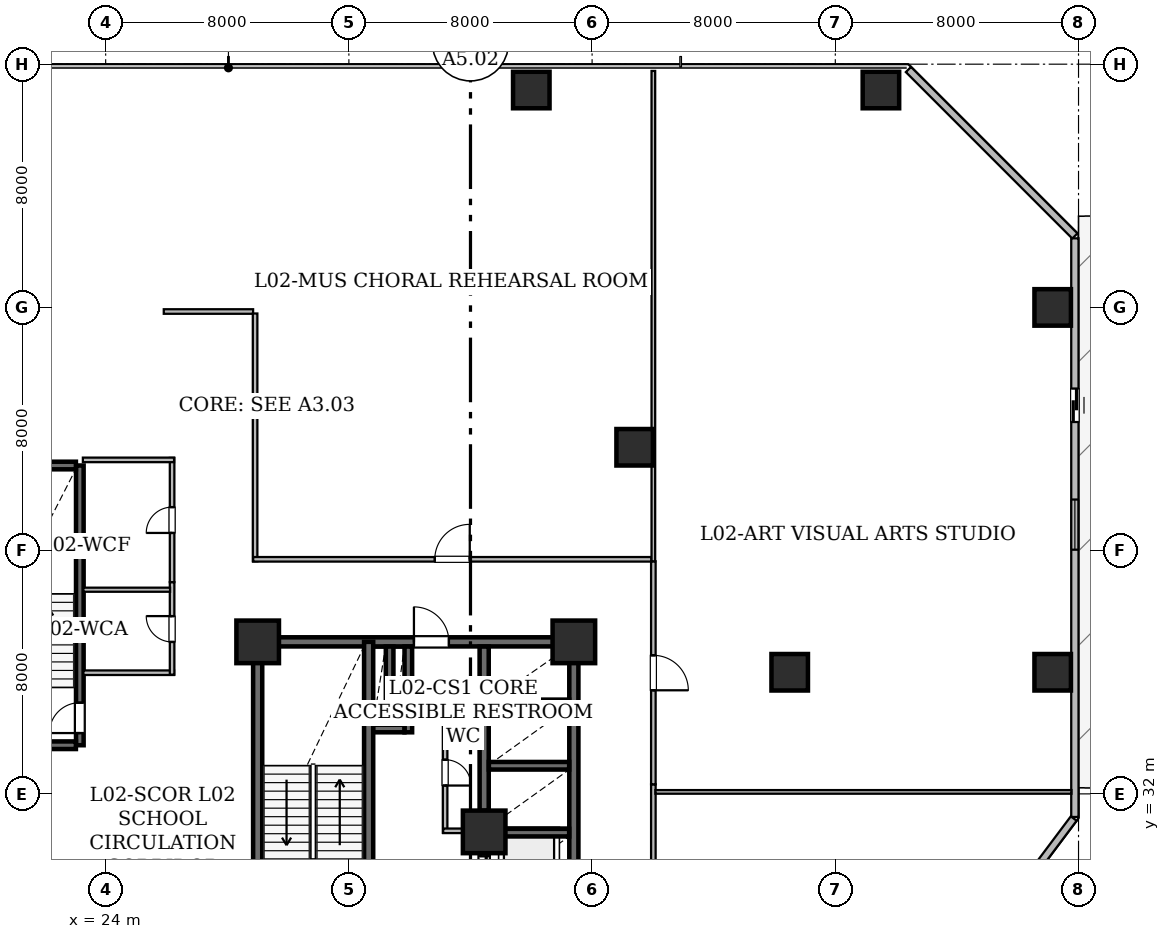
"""IFC4 building model, lengths in metres.
Left out: names, types, materials, properties, quantities, classifications, styles, units other than length and angle.
Written with IfcOpenShell. Run it as: python <this file> out.ifc"""

import sys

from ifc_helpers import new_model, si_unit, direction, frame, frame_2d, origin, origin_2d, place, context, subcontext, project, spatial, rectangle, hollow_rectangle, extrude, element, fill, save


model = new_model("IFC4")
c1 = context("Model", 3, precision=1e-05, world=origin(), true_north=direction((0.0, 1.0)))
c2 = subcontext(c1, "Body", "Model", "MODEL_VIEW")
j1 = project(units=[si_unit("LENGTHUNIT", "METRE"), si_unit("PLANEANGLEUNIT", "RADIAN")], contexts=[c1])
p1 = place(None, origin())
s1 = spatial("IfcSite", under=j1, at=p1, CompositionType="ELEMENT")
p2 = place(p1, origin())
s2 = spatial("IfcBuilding", under=s1, at=p2, CompositionType="ELEMENT")
p3 = place(p2, frame((0.0, 0.0, 12.0)))
s3 = spatial("IfcBuildingStorey", under=s2, at=p3, CompositionType="ELEMENT", Elevation=12.0)
for number, where, z_axis, x_axis in (
    (1, (29.0, 37.0, 0.0), (0.0, 0.0, 1.0), (1.0, 0.0, 0.0)),
    (2, (36.45, 30.75, 0.0), (0.0, 0.0, 1.0), (1.0, 0.0, 0.0)),
    (3, (39.4, 37.0, 0.0), (0.0, 0.0, 1.0), (1.0, 0.0, 0.0)),
):
    element("IfcColumn", number, at=place(p3, frame(where, z_axis=z_axis, x_axis=x_axis)), inside=s3, PredefinedType="COLUMN", context=c2, shape_type="SweptSolid", body=[
        extrude(hollow_rectangle(XDim=1.4, YDim=1.4, WallThickness=0.07, at=origin_2d()), origin(), (0.0, 0.0, 1.0), 4.2),
    ])
for number, where, z_axis, x_axis in (
    (4, (38.0, 55.15, 0.0), (0.0, 0.0, 1.0), (1.0, 0.0, 0.0)),
    (5, (49.5, 55.15, 0.0), (0.0, 0.0, 1.0), (1.0, 0.0, 0.0)),
    (6, (55.15, 36.0, 0.0), (0.0, 0.0, 1.0), (1.0, 0.0, 0.0)),
    (7, (55.15, 48.0, 0.0), (0.0, 0.0, 1.0), (1.0, 0.0, 0.0)),
    (8, (41.4, 43.4, 0.0), (0.0, 0.0, 1.0), (1.0, 0.0, 0.0)),
    (9, (46.5, 36.0, 0.0), (0.0, 0.0, 1.0), (1.0, 0.0, 0.0)),
):
    element("IfcColumn", number, at=place(p3, frame(where, z_axis=z_axis, x_axis=x_axis)), inside=s3, PredefinedType="COLUMN", context=c2, shape_type="SweptSolid", body=[
        extrude(hollow_rectangle(XDim=1.2, YDim=1.2, WallThickness=0.06, at=origin_2d()), origin(), (0.0, 0.0, 1.0), 4.2),
    ])
p4 = place(p3, frame((50.405, 55.825, 0.0), z_axis=(0.0, 0.0, 1.0), x_axis=(0.707106781187, -0.707106781187, 0.0)))
e10 = element("IfcWall", 10, at=p4, inside=s3, PredefinedType="STANDARD", context=c2, shape_type="SweptSolid", body=[
    extrude(rectangle(XDim=7.743, YDim=0.24, at=frame_2d((3.871, 0.0))), origin(), (0.0, 0.0, 1.0), 3.92),
])
p5 = place(p3, frame((55.88, 50.272, 0.0), z_axis=(0.0, 0.0, 1.0), x_axis=(0.0, -1.0, 0.0)))
e11 = element("IfcWall", 11, at=p5, inside=s3, PredefinedType="STANDARD", context=c2, shape_type="SweptSolid", body=[
    extrude(rectangle(XDim=19.032, YDim=0.24, at=frame_2d((9.516, 0.0))), origin(), (0.0, 0.0, 1.0), 3.92),
])
p6 = place(p5, frame((4.941, 0.0, 0.0)))
e12 = element("IfcOpeningElement", 12, at=p6, cuts=e11, PredefinedType="OPENING", context=c2, shape_type="SweptSolid", body=[
    extrude(rectangle(XDim=1.1, YDim=2.2, at=frame_2d((0.55, 1.1))), frame((0.0, 0.13, 0.0), z_axis=(0.0, -1.0, 0.0), x_axis=(1.0, 0.0, 0.0)), (0.0, 0.0, 1.0), 0.26),
])
p7 = place(p5, frame((8.591, 0.0, 0.85)))
e13 = element("IfcOpeningElement", 13, at=p7, cuts=e11, PredefinedType="OPENING", context=c2, shape_type="SweptSolid", body=[
    extrude(rectangle(XDim=1.65, YDim=1.55, at=frame_2d((0.825, 0.775))), frame((0.0, 0.13, 0.0), z_axis=(0.0, -1.0, 0.0), x_axis=(1.0, 0.0, 0.0)), (0.0, 0.0, 1.0), 0.26),
])
p8 = place(p3, frame((55.842, 31.189, 0.0), z_axis=(0.0, 0.0, 1.0), x_axis=(-0.600058791648, -0.799955902889, 0.0)))
e14 = element("IfcWall", 14, at=p8, inside=s3, PredefinedType="STANDARD", context=c2, shape_type="SweptSolid", body=[
    extrude(rectangle(XDim=3.986, YDim=0.24, at=frame_2d((1.993, 0.0))), origin(), (0.0, 0.0, 1.0), 3.92),
])
p9 = place(p3, frame((29.0, 28.0, 0.0), z_axis=(0.0, 0.0, 1.0), x_axis=(0.0, 1.0, 0.0)))
e15 = element("IfcWall", 15, at=p9, inside=s3, PredefinedType="SHEAR", context=c2, shape_type="SweptSolid", body=[
    extrude(rectangle(XDim=9.0, YDim=0.3, at=frame_2d((4.5, 0.0))), origin(), (0.0, 0.0, 1.0), 3.92),
])
p10 = place(p3, frame((29.0, 37.0, 0.0), z_axis=(0.0, 0.0, 1.0), x_axis=(1.0, 0.0, 0.0)))
e16 = element("IfcWall", 16, at=p10, inside=s3, PredefinedType="SHEAR", context=c2, shape_type="SweptSolid", body=[
    extrude(rectangle(XDim=10.4, YDim=0.3, at=frame_2d((5.2, 0.0))), origin(), (0.0, 0.0, 1.0), 3.92),
])
p11 = place(p10, frame((5.14, 0.0, 0.0)))
e17 = element("IfcOpeningElement", 17, at=p11, cuts=e16, PredefinedType="OPENING", context=c2, shape_type="SweptSolid", body=[
    extrude(rectangle(XDim=1.15, YDim=2.2, at=frame_2d((0.575, 1.1))), frame((0.0, 0.16, 0.0), z_axis=(0.0, -1.0, 0.0), x_axis=(1.0, 0.0, 0.0)), (0.0, 0.0, 1.0), 0.32),
])
p12 = place(p3, frame((39.4, 24.4, 0.0), z_axis=(0.0, 0.0, 1.0), x_axis=(0.0, 1.0, 0.0)))
e18 = element("IfcWall", 18, at=p12, inside=s3, PredefinedType="SHEAR", context=c2, shape_type="SweptSolid", body=[
    extrude(rectangle(XDim=12.6, YDim=0.3, at=frame_2d((6.3, 0.0))), origin(), (0.0, 0.0, 1.0), 3.92),
])
p13 = place(p3, frame((32.65, 28.0, 0.0), z_axis=(0.0, 0.0, 1.0), x_axis=(0.0, 1.0, 0.0)))
e19 = element("IfcWall", 19, at=p13, inside=s3, PredefinedType="SHEAR", context=c2, shape_type="SweptSolid", body=[
    extrude(rectangle(XDim=9.0, YDim=0.3, at=frame_2d((4.5, 0.0))), origin(), (0.0, 0.0, 1.0), 3.92),
])
p14 = place(p13, frame((0.72, 0.0, 0.0)))
e20 = element("IfcOpeningElement", 20, at=p14, cuts=e19, PredefinedType="OPENING", context=c2, shape_type="SweptSolid", body=[
    extrude(rectangle(XDim=1.0, YDim=2.15, at=frame_2d((0.5, 1.075))), frame((0.0, 0.16, 0.0), z_axis=(0.0, -1.0, 0.0), x_axis=(1.0, 0.0, 0.0)), (0.0, 0.0, 1.0), 0.32),
])
p15 = place(p3, frame((36.45, 25.1, 0.0), z_axis=(0.0, 0.0, 1.0), x_axis=(0.0, 1.0, 0.0)))
e21 = element("IfcWall", 21, at=p15, inside=s3, PredefinedType="SHEAR", context=c2, shape_type="SweptSolid", body=[
    extrude(rectangle(XDim=4.95, YDim=0.3, at=frame_2d((2.475, 0.0))), origin(), (0.0, 0.0, 1.0), 3.92),
])
p16 = place(p15, frame((0.12, 0.0, 0.0)))
e22 = element("IfcOpeningElement", 22, at=p16, cuts=e21, PredefinedType="OPENING", context=c2, shape_type="SweptSolid", body=[
    extrude(rectangle(XDim=1.05, YDim=2.15, at=frame_2d((0.525, 1.075))), frame((0.0, 0.16, 0.0), z_axis=(0.0, -1.0, 0.0), x_axis=(1.0, 0.0, 0.0)), (0.0, 0.0, 1.0), 0.32),
])
p17 = place(p15, frame((1.995, 0.0, 0.0)))
e23 = element("IfcOpeningElement", 23, at=p17, cuts=e21, PredefinedType="OPENING", context=c2, shape_type="SweptSolid", body=[
    extrude(rectangle(XDim=1.05, YDim=2.15, at=frame_2d((0.525, 1.075))), frame((0.0, 0.16, 0.0), z_axis=(0.0, -1.0, 0.0), x_axis=(1.0, 0.0, 0.0)), (0.0, 0.0, 1.0), 0.32),
])
p18 = place(p15, frame((3.795, 0.0, 0.0)))
e24 = element("IfcOpeningElement", 24, at=p18, cuts=e21, PredefinedType="OPENING", context=c2, shape_type="SweptSolid", body=[
    extrude(rectangle(XDim=1.05, YDim=2.15, at=frame_2d((0.525, 1.075))), frame((0.0, 0.16, 0.0), z_axis=(0.0, -1.0, 0.0), x_axis=(1.0, 0.0, 0.0)), (0.0, 0.0, 1.0), 0.32),
])
p19 = place(p3, frame((36.45, 31.45, 0.0), z_axis=(0.0, 0.0, 1.0), x_axis=(0.0, 1.0, 0.0)))
e25 = element("IfcWall", 25, at=p19, inside=s3, PredefinedType="SHEAR", context=c2, shape_type="SweptSolid", body=[
    extrude(rectangle(XDim=5.396, YDim=0.3, at=frame_2d((2.698, 0.0))), origin(), (0.0, 0.0, 1.0), 3.92),
])
for number, where, z_axis, x_axis in (
    (26, (36.604, 30.725, 0.0), (0.0, 0.0, 1.0), (1.0, 0.0, 0.0)),
    (27, (36.604, 32.925, 0.0), (0.0, 0.0, 1.0), (1.0, 0.0, 0.0)),
    (28, (36.604, 34.975, 0.0), (0.0, 0.0, 1.0), (1.0, 0.0, 0.0)),
):
    element("IfcWall", number, at=place(p3, frame(where, z_axis=z_axis, x_axis=x_axis)), inside=s3, PredefinedType="SHEAR", context=c2, shape_type="SweptSolid", body=[
        extrude(rectangle(XDim=2.642, YDim=0.25, at=frame_2d((1.321, 0.0))), origin(), (0.0, 0.0, 1.0), 3.92),
    ])
p20 = place(p3, frame((33.955, 34.025, 0.0), z_axis=(0.0, 0.0, 1.0), x_axis=(0.0, 1.0, 0.0)))
e29 = element("IfcWall", 29, at=p20, inside=s3, PredefinedType="SHEAR", context=c2, shape_type="SweptSolid", body=[
    extrude(rectangle(XDim=2.821, YDim=0.25, at=frame_2d((1.411, 0.0))), origin(), (0.0, 0.0, 1.0), 3.92),
])
p21 = place(p3, frame((32.804, 34.15, 0.0), z_axis=(0.0, 0.0, 1.0), x_axis=(1.0, 0.0, 0.0)))
e30 = element("IfcWall", 30, at=p21, inside=s3, PredefinedType="SHEAR", context=c2, shape_type="SweptSolid", body=[
    extrude(rectangle(XDim=1.022, YDim=0.25, at=frame_2d((0.511, 0.0))), origin(), (0.0, 0.0, 1.0), 3.92),
])
p22 = place(p3, frame((33.34, 34.279, 0.0), z_axis=(0.0, 0.0, 1.0), x_axis=(0.0, 1.0, 0.0)))
e31 = element("IfcWall", 31, at=p22, inside=s3, PredefinedType="SHEAR", context=c2, shape_type="SweptSolid", body=[
    extrude(rectangle(XDim=2.567, YDim=0.25, at=frame_2d((1.283, 0.0))), origin(), (0.0, 0.0, 1.0), 3.92),
])
p23 = place(p3, frame((23.15, 33.6, 0.0), z_axis=(0.0, 0.0, 1.0), x_axis=(0.0, 1.0, 0.0)))
e32 = element("IfcWall", 32, at=p23, inside=s3, PredefinedType="SHEAR", context=c2, shape_type="SweptSolid", body=[
    extrude(rectangle(XDim=9.2, YDim=0.25, at=frame_2d((4.6, 0.0))), origin(), (0.0, 0.0, 1.0), 3.92),
])
p24 = place(p23, frame((0.4, 0.0, 0.0)))
e33 = element("IfcOpeningElement", 33, at=p24, cuts=e32, PredefinedType="OPENING", context=c2, shape_type="SweptSolid", body=[
    extrude(rectangle(XDim=1.0, YDim=2.15, at=frame_2d((0.5, 1.075))), frame((0.0, 0.135, 0.0), z_axis=(0.0, -1.0, 0.0), x_axis=(1.0, 0.0, 0.0)), (0.0, 0.0, 1.0), 0.27),
])
for number, where, z_axis, x_axis in (
    (34, (19.329, 33.6, 0.0), (0.0, 0.0, 1.0), (1.0, 0.0, 0.0)),
    (35, (19.329, 42.8, 0.0), (0.0, 0.0, 1.0), (1.0, 0.0, 0.0)),
):
    element("IfcWall", number, at=place(p3, frame(where, z_axis=z_axis, x_axis=x_axis)), inside=s3, PredefinedType="SHEAR", context=c2, shape_type="SweptSolid", body=[
        extrude(rectangle(XDim=3.692, YDim=0.25, at=frame_2d((1.846, 0.0))), origin(), (0.0, 0.0, 1.0), 3.92),
    ])
p25 = place(p3, frame((36.306, 34.615, 0.0), z_axis=(0.0, 0.0, 1.0), x_axis=(-1.0, 0.0, 0.0)))
e36 = element("IfcWall", 36, at=p25, inside=s3, PredefinedType="STANDARD", context=c2, shape_type="SweptSolid", body=[
    extrude(rectangle(XDim=1.206, YDim=0.15, at=frame_2d((0.603, 0.0))), origin(), (0.0, 0.0, 1.0), 3.92),
])
p26 = place(p3, frame((35.165, 34.678, 0.0), z_axis=(0.0, 0.0, 1.0), x_axis=(0.0, -1.0, 0.0)))
e37 = element("IfcWall", 37, at=p26, inside=s3, PredefinedType="STANDARD", context=c2, shape_type="SweptSolid", body=[
    extrude(rectangle(XDim=3.958, YDim=0.15, at=frame_2d((1.979, 0.0))), origin(), (0.0, 0.0, 1.0), 3.92),
])
p27 = place(p26, frame((1.554, 0.0, 0.0)))
e38 = element("IfcOpeningElement", 38, at=p27, cuts=e37, PredefinedType="OPENING", context=c2, shape_type="SweptSolid", body=[
    extrude(rectangle(XDim=0.85, YDim=2.1, at=frame_2d((0.425, 1.05))), frame((0.0, 0.085, 0.0), z_axis=(0.0, -1.0, 0.0), x_axis=(1.0, 0.0, 0.0)), (0.0, 0.0, 1.0), 0.17),
])
p28 = place(p3, frame((35.102, 30.785, 0.0), z_axis=(0.0, 0.0, 1.0), x_axis=(1.0, 0.0, 0.0)))
e39 = element("IfcWall", 39, at=p28, inside=s3, PredefinedType="STANDARD", context=c2, shape_type="SweptSolid", body=[
    extrude(rectangle(XDim=1.198, YDim=0.15, at=frame_2d((0.599, 0.0))), origin(), (0.0, 0.0, 1.0), 3.92),
])
p29 = place(p3, frame((23.267, 35.985, 0.0), z_axis=(0.0, 0.0, 1.0), x_axis=(1.0, 0.0, 0.0)))
e40 = element("IfcWall", 40, at=p29, inside=s3, PredefinedType="STANDARD", context=c2, shape_type="SweptSolid", body=[
    extrude(rectangle(XDim=2.983, YDim=0.15, at=frame_2d((1.491, 0.0))), origin(), (0.0, 0.0, 1.0), 3.92),
])
p30 = place(p3, frame((26.185, 35.922, 0.0), z_axis=(0.0, 0.0, 1.0), x_axis=(0.0, 1.0, 0.0)))
e41 = element("IfcWall", 41, at=p30, inside=s3, PredefinedType="STANDARD", context=c2, shape_type="SweptSolid", body=[
    extrude(rectangle(XDim=3.042, YDim=0.15, at=frame_2d((1.521, 0.0))), origin(), (0.0, 0.0, 1.0), 3.92),
])
p31 = place(p30, frame((1.075, 0.0, 0.0)))
e42 = element("IfcOpeningElement", 42, at=p31, cuts=e41, PredefinedType="OPENING", context=c2, shape_type="SweptSolid", body=[
    extrude(rectangle(XDim=0.85, YDim=2.1, at=frame_2d((0.425, 1.05))), frame((0.0, 0.085, 0.0), z_axis=(0.0, -1.0, 0.0), x_axis=(1.0, 0.0, 0.0)), (0.0, 0.0, 1.0), 0.17),
])
p32 = place(p3, frame((26.185, 38.964, 0.0), z_axis=(0.0, 0.0, 1.0), x_axis=(0.0, 1.0, 0.0)))
e43 = element("IfcWall", 43, at=p32, inside=s3, PredefinedType="STANDARD", context=c2, shape_type="SweptSolid", body=[
    extrude(rectangle(XDim=4.086, YDim=0.15, at=frame_2d((2.043, 0.0))), origin(), (0.0, 0.0, 1.0), 3.92),
])
p33 = place(p32, frame((1.618, 0.0, 0.0)))
e44 = element("IfcOpeningElement", 44, at=p33, cuts=e43, PredefinedType="OPENING", context=c2, shape_type="SweptSolid", body=[
    extrude(rectangle(XDim=0.85, YDim=2.1, at=frame_2d((0.425, 1.05))), frame((0.0, 0.085, 0.0), z_axis=(0.0, -1.0, 0.0), x_axis=(1.0, 0.0, 0.0)), (0.0, 0.0, 1.0), 0.17),
])
p34 = place(p3, frame((26.25, 42.985, 0.0), z_axis=(0.0, 0.0, 1.0), x_axis=(-1.0, 0.0, 0.0)))
e45 = element("IfcWall", 45, at=p34, inside=s3, PredefinedType="STANDARD", context=c2, shape_type="SweptSolid", body=[
    extrude(rectangle(XDim=3.0, YDim=0.15, at=frame_2d((1.5, 0.0))), origin(), (0.0, 0.0, 1.0), 3.92),
])
p35 = place(p3, frame((42.015, 32.314, 0.0), z_axis=(0.0, 0.0, 1.0), x_axis=(0.0, -1.0, 0.0)))
e46 = element("IfcWall", 46, at=p35, inside=s3, PredefinedType="STANDARD", context=c2, shape_type="SweptSolid", body=[
    extrude(rectangle(XDim=15.964, YDim=0.15, at=frame_2d((7.982, 0.0))), origin(), (0.0, 0.0, 1.0), 3.055),
])
p36 = place(p35, frame((7.428, 0.0, 0.0)))
e47 = element("IfcOpeningElement", 47, at=p36, cuts=e46, PredefinedType="OPENING", context=c2, shape_type="SweptSolid", body=[
    extrude(rectangle(XDim=1.15, YDim=2.2, at=frame_2d((0.575, 1.1))), frame((0.0, 0.085, 0.0), z_axis=(0.0, -1.0, 0.0), x_axis=(1.0, 0.0, 0.0)), (0.0, 0.0, 1.0), 0.17),
])
p37 = place(p3, frame((42.015, 39.65, 0.0), z_axis=(0.0, 0.0, 1.0), x_axis=(0.0, -1.0, 0.0)))
e48 = element("IfcWall", 48, at=p37, inside=s3, PredefinedType="STANDARD", context=c2, shape_type="SweptSolid", body=[
    extrude(rectangle(XDim=7.336, YDim=0.15, at=frame_2d((3.668, 0.0))), origin(), (0.0, 0.0, 1.0), 3.055),
])
p38 = place(p37, frame((3.093, 0.0, 0.0)))
e49 = element("IfcOpeningElement", 49, at=p38, cuts=e48, PredefinedType="OPENING", context=c2, shape_type="SweptSolid", body=[
    extrude(rectangle(XDim=1.15, YDim=2.2, at=frame_2d((0.575, 1.1))), frame((0.0, 0.085, 0.0), z_axis=(0.0, -1.0, 0.0), x_axis=(1.0, 0.0, 0.0)), (0.0, 0.0, 1.0), 0.17),
])
p39 = place(p3, frame((25.911, 47.865, 0.0), z_axis=(0.0, 0.0, 1.0), x_axis=(1.0, 0.0, 0.0)))
e50 = element("IfcWall", 50, at=p39, inside=s3, PredefinedType="STANDARD", context=c2, shape_type="SweptSolid", body=[
    extrude(rectangle(XDim=2.939, YDim=0.15, at=frame_2d((1.47, 0.0))), origin(), (0.0, 0.0, 1.0), 3.92),
])
p40 = place(p3, frame((28.915, 47.8, 0.0), z_axis=(0.0, 0.0, 1.0), x_axis=(0.0, -1.0, 0.0)))
e51 = element("IfcWall", 51, at=p40, inside=s3, PredefinedType="STANDARD", context=c2, shape_type="SweptSolid", body=[
    extrude(rectangle(XDim=8.15, YDim=0.15, at=frame_2d((4.075, 0.0))), origin(), (0.0, 0.0, 1.0), 3.055),
])
p41 = place(p3, frame((28.852, 39.715, 0.0), z_axis=(0.0, 0.0, 1.0), x_axis=(1.0, 0.0, 0.0)))
e52 = element("IfcWall", 52, at=p41, inside=s3, PredefinedType="STANDARD", context=c2, shape_type="SweptSolid", body=[
    extrude(rectangle(XDim=13.098, YDim=0.15, at=frame_2d((6.549, 0.0))), origin(), (0.0, 0.0, 1.0), 3.055),
])
p42 = place(p41, frame((5.974, 0.0, 0.0)))
e53 = element("IfcOpeningElement", 53, at=p42, cuts=e52, PredefinedType="OPENING", context=c2, shape_type="SweptSolid", body=[
    extrude(rectangle(XDim=1.15, YDim=2.2, at=frame_2d((0.575, 1.1))), frame((0.0, 0.085, 0.0), z_axis=(0.0, -1.0, 0.0), x_axis=(1.0, 0.0, 0.0)), (0.0, 0.0, 1.0), 0.17),
])
p43 = place(p3, frame((23.267, 38.715, 0.0), z_axis=(0.0, 0.0, 1.0), x_axis=(1.0, 0.0, 0.0)))
e54 = element("IfcWall", 54, at=p43, inside=s3, PredefinedType="PARTITIONING", context=c2, shape_type="SweptSolid", body=[
    extrude(rectangle(XDim=2.851, YDim=0.135, at=frame_2d((1.425, 0.0))), origin(), (0.0, 0.0, 1.0), 3.92),
])
p44 = place(p3, frame((42.082, 32.065, 0.0), z_axis=(0.0, 0.0, 1.0), x_axis=(1.0, 0.0, 0.0)))
e55 = element("IfcWall", 55, at=p44, inside=s3, PredefinedType="PARTITIONING", context=c2, shape_type="SweptSolid", body=[
    extrude(rectangle(XDim=13.686, YDim=0.12, at=frame_2d((6.843, 0.0))), origin(), (0.0, 0.0, 1.0), 3.055),
])
p45 = place(p3, frame((42.015, 39.65, 0.0), z_axis=(0.0, 0.0, 1.0), x_axis=(0.0, 1.0, 0.0)))
e56 = element("IfcWall", 56, at=p45, inside=s3, PredefinedType="PARTITIONING", context=c2, shape_type="SweptSolid", body=[
    extrude(rectangle(XDim=16.128, YDim=0.12, at=frame_2d((8.064, 0.0))), origin(), (0.0, 0.0, 1.0), 3.055),
])
p46 = place(p6, origin())
e57 = element("IfcDoor", 57, at=p46, inside=s3, OperationType="SLIDING_TO_LEFT", PredefinedType="DOOR", context=c2, shape_type="SweptSolid", body=[
    extrude(rectangle(XDim=1.1, YDim=2.2, at=frame_2d((0.55, 1.1))), frame((0.0, 0.025, 0.0), z_axis=(0.0, -1.0, 0.0), x_axis=(1.0, 0.0, 0.0)), (0.0, 0.0, 1.0), 0.05),
])
fill(e12, e57)
p47 = place(p7, origin())
e58 = element("IfcWindow", 58, at=p47, inside=s3, PartitioningType="SINGLE_PANEL", PredefinedType="WINDOW", context=c2, shape_type="SweptSolid", body=[
    extrude(rectangle(XDim=1.65, YDim=1.55, at=frame_2d((0.825, 0.775))), frame((0.0, 0.03, 0.0), z_axis=(0.0, -1.0, 0.0), x_axis=(1.0, 0.0, 0.0)), (0.0, 0.0, 1.0), 0.06),
])
fill(e13, e58)
p48 = place(p11, origin())
e59 = element("IfcDoor", 59, at=p48, inside=s3, OperationType="SINGLE_SWING_LEFT", PredefinedType="DOOR", context=c2, shape_type="SweptSolid", body=[
    extrude(rectangle(XDim=1.15, YDim=2.2, at=frame_2d((0.575, 1.1))), frame((0.0, 0.025, 0.0), z_axis=(0.0, -1.0, 0.0), x_axis=(1.0, 0.0, 0.0)), (0.0, 0.0, 1.0), 0.05),
])
fill(e17, e59)
p49 = place(p18, origin())
e60 = element("IfcDoor", 60, at=p49, inside=s3, OperationType="SLIDING_TO_LEFT", PredefinedType="DOOR", context=c2, shape_type="SweptSolid", body=[
    extrude(rectangle(XDim=1.05, YDim=2.15, at=frame_2d((0.525, 1.075))), frame((0.0, 0.025, 0.0), z_axis=(0.0, -1.0, 0.0), x_axis=(1.0, 0.0, 0.0)), (0.0, 0.0, 1.0), 0.05),
])
fill(e24, e60)
p50 = place(p24, origin())
e61 = element("IfcDoor", 61, at=p50, inside=s3, OperationType="SINGLE_SWING_LEFT", PredefinedType="DOOR", context=c2, shape_type="SweptSolid", body=[
    extrude(rectangle(XDim=1.0, YDim=2.15, at=frame_2d((0.5, 1.075))), frame((0.0, 0.025, 0.0), z_axis=(0.0, -1.0, 0.0), x_axis=(1.0, 0.0, 0.0)), (0.0, 0.0, 1.0), 0.05),
])
fill(e33, e61)
p51 = place(p27, origin())
e62 = element("IfcDoor", 62, at=p51, inside=s3, OperationType="SINGLE_SWING_RIGHT", PredefinedType="DOOR", context=c2, shape_type="SweptSolid", body=[
    extrude(rectangle(XDim=0.85, YDim=2.1, at=frame_2d((0.425, 1.05))), frame((0.0, 0.025, 0.0), z_axis=(0.0, -1.0, 0.0), x_axis=(1.0, 0.0, 0.0)), (0.0, 0.0, 1.0), 0.05),
])
fill(e38, e62)
p52 = place(p31, origin())
e63 = element("IfcDoor", 63, at=p52, inside=s3, OperationType="SINGLE_SWING_RIGHT", PredefinedType="DOOR", context=c2, shape_type="SweptSolid", body=[
    extrude(rectangle(XDim=0.85, YDim=2.1, at=frame_2d((0.425, 1.05))), frame((0.0, 0.025, 0.0), z_axis=(0.0, -1.0, 0.0), x_axis=(1.0, 0.0, 0.0)), (0.0, 0.0, 1.0), 0.05),
])
fill(e42, e63)
p53 = place(p33, origin())
e64 = element("IfcDoor", 64, at=p53, inside=s3, OperationType="SINGLE_SWING_LEFT", PredefinedType="DOOR", context=c2, shape_type="SweptSolid", body=[
    extrude(rectangle(XDim=0.85, YDim=2.1, at=frame_2d((0.425, 1.05))), frame((0.0, 0.025, 0.0), z_axis=(0.0, -1.0, 0.0), x_axis=(1.0, 0.0, 0.0)), (0.0, 0.0, 1.0), 0.05),
])
fill(e44, e64)
p54 = place(p38, origin())
e65 = element("IfcDoor", 65, at=p54, inside=s3, OperationType="SINGLE_SWING_RIGHT", PredefinedType="DOOR", context=c2, shape_type="SweptSolid", body=[
    extrude(rectangle(XDim=1.15, YDim=2.2, at=frame_2d((0.575, 1.1))), frame((0.0, 0.025, 0.0), z_axis=(0.0, -1.0, 0.0), x_axis=(1.0, 0.0, 0.0)), (0.0, 0.0, 1.0), 0.05),
])
fill(e49, e65)
p55 = place(p42, origin())
e66 = element("IfcDoor", 66, at=p55, inside=s3, OperationType="SINGLE_SWING_RIGHT", PredefinedType="DOOR", context=c2, shape_type="SweptSolid", body=[
    extrude(rectangle(XDim=1.15, YDim=2.2, at=frame_2d((0.575, 1.1))), frame((0.0, 0.025, 0.0), z_axis=(0.0, -1.0, 0.0), x_axis=(1.0, 0.0, 0.0)), (0.0, 0.0, 1.0), 0.05),
])
fill(e53, e66)
save(model, sys.argv[1])
